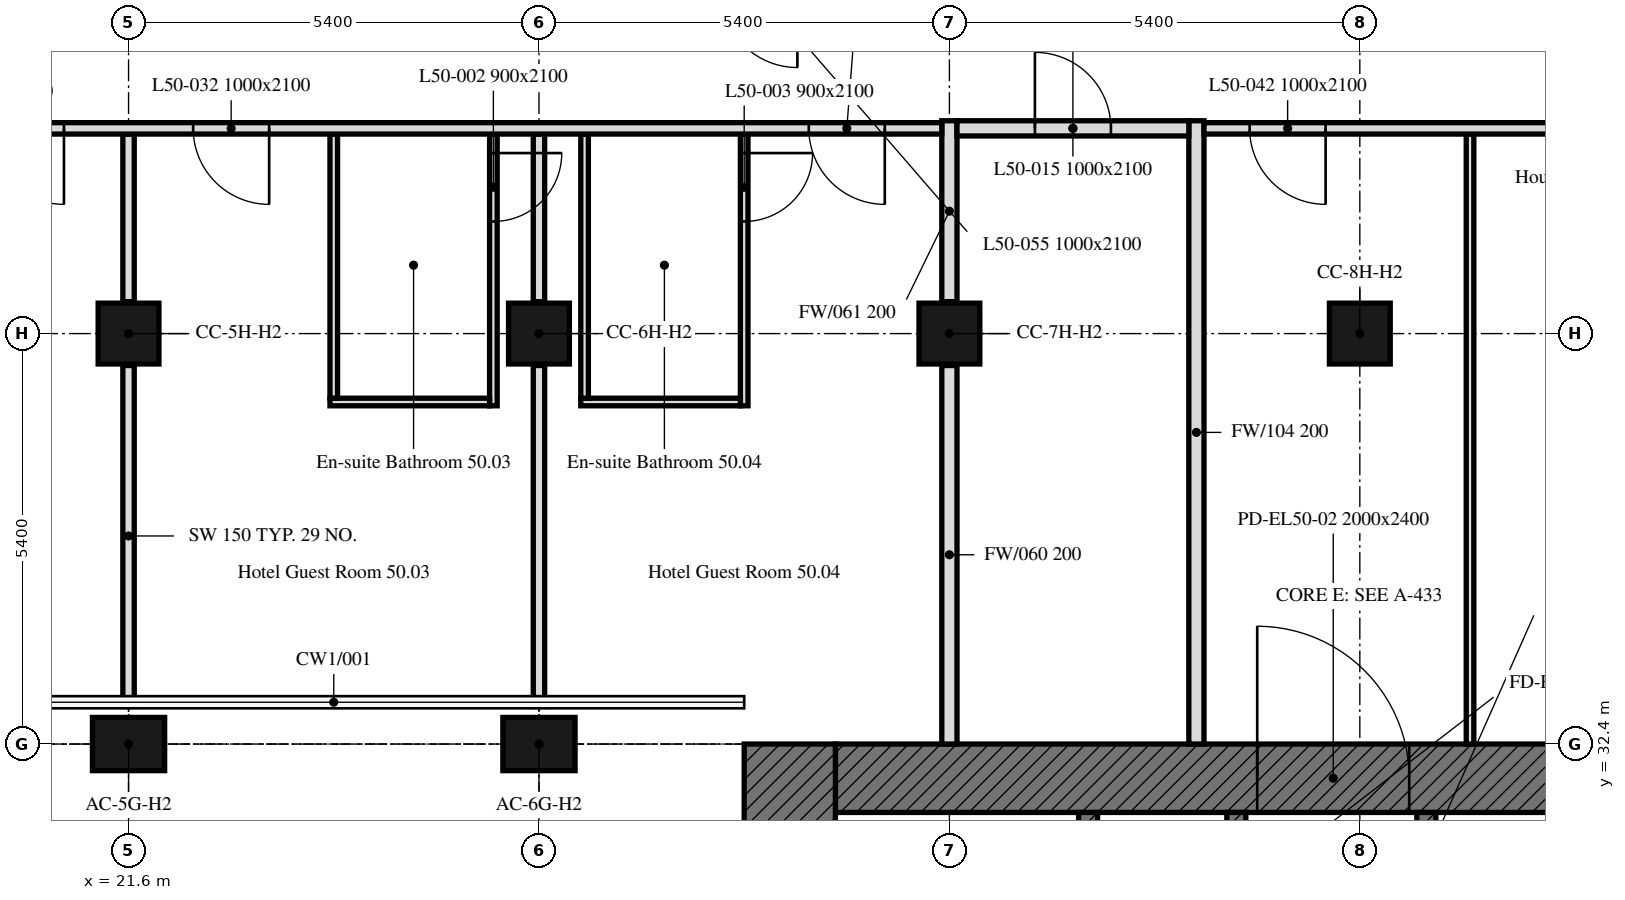
"""IFC4 building model, lengths in metres.
Left out: names, types, materials, properties, quantities, classifications, styles, units other than length and angle.
Written with IfcOpenShell. Run it as: python <this file> out.ifc"""

import sys

from ifc_helpers import new_model, si_unit, direction, frame, frame_2d, origin, origin_2d, place, context, subcontext, project, spatial, rectangle, extrude, element, fill, save


model = new_model("IFC4")
c1 = context("Model", 3, precision=1e-05, world=origin(), true_north=direction((0.0, 1.0)))
c2 = subcontext(c1, "Body", "Model", "MODEL_VIEW")
j1 = project(units=[si_unit("LENGTHUNIT", "METRE"), si_unit("PLANEANGLEUNIT", "RADIAN")], contexts=[c1])
p1 = place(None, origin())
s1 = spatial("IfcSite", under=j1, at=p1, CompositionType="ELEMENT")
p2 = place(p1, origin())
s2 = spatial("IfcBuilding", under=s1, at=p2, CompositionType="ELEMENT")
p3 = place(p2, frame((0.0, 0.0, 203.8)))
s3 = spatial("IfcBuildingStorey", under=s2, at=p3, CompositionType="ELEMENT", Elevation=203.8)
for number, where, z_axis, x_axis in (
    (1, (21.6, 32.4, 0.0), (0.0, 0.0, 1.0), (1.0, 0.0, 0.0)),
    (2, (27.0, 32.4, 0.0), (0.0, 0.0, 1.0), (1.0, 0.0, 0.0)),
):
    element("IfcColumn", number, at=place(p3, frame(where, z_axis=z_axis, x_axis=x_axis)), inside=s3, PredefinedType="COLUMN", context=c2, shape_type="SweptSolid", body=[
        extrude(rectangle(XDim=0.95, YDim=0.7, at=origin_2d()), origin(), (0.0, 0.0, 1.0), 3.0),
    ])
for number, where, z_axis, x_axis in (
    (3, (21.6, 37.8, 0.0), (0.0, 0.0, 1.0), (1.0, 0.0, 0.0)),
    (4, (27.0, 37.8, 0.0), (0.0, 0.0, 1.0), (1.0, 0.0, 0.0)),
    (5, (32.4, 37.8, 0.0), (0.0, 0.0, 1.0), (1.0, 0.0, 0.0)),
    (6, (37.8, 37.8, 0.0), (0.0, 0.0, 1.0), (1.0, 0.0, 0.0)),
):
    element("IfcColumn", number, at=place(p3, frame(where, z_axis=z_axis, x_axis=x_axis)), inside=s3, PredefinedType="COLUMN", context=c2, shape_type="SweptSolid", body=[
        extrude(rectangle(XDim=0.8, YDim=0.8, at=origin_2d()), origin(), (0.0, 0.0, 1.0), 3.0),
    ])
p4 = place(p3, frame((30.9, 31.95, 0.0), z_axis=(0.0, 0.0, 1.0), x_axis=(1.0, 0.0, 0.0)))
e7 = element("IfcWall", 7, at=p4, inside=s3, PredefinedType="SOLIDWALL", context=c2, shape_type="SweptSolid", body=[
    extrude(rectangle(XDim=11.1, YDim=0.9, at=frame_2d((5.55, 0.0))), origin(), (0.0, 0.0, 1.0), 3.0),
])
p5 = place(p4, frame((5.55, 0.0, 0.0)))
e8 = element("IfcOpeningElement", 8, at=p5, cuts=e7, PredefinedType="OPENING", context=c2, shape_type="SweptSolid", body=[
    extrude(rectangle(XDim=2.0, YDim=2.4, at=frame_2d((1.0, 1.2))), frame((0.0, 0.45, 0.0), z_axis=(0.0, -1.0, 0.0), x_axis=(1.0, 0.0, 0.0)), (0.0, 0.0, 1.0), 0.9),
])
p6 = place(p3, frame((30.3, 16.2, 0.0), z_axis=(0.0, 0.0, 1.0), x_axis=(0.0, 1.0, 0.0)))
e9 = element("IfcWall", 9, at=p6, inside=s3, PredefinedType="SOLIDWALL", context=c2, shape_type="SweptSolid", body=[
    extrude(rectangle(XDim=16.2, YDim=1.2, at=frame_2d((8.1, 0.0))), origin(), (0.0, 0.0, 1.0), 3.0),
])
p7 = place(p3, frame((38.675, 17.1, 0.0), z_axis=(0.0, 0.0, 1.0), x_axis=(0.0, 1.0, 0.0)))
e10 = element("IfcWall", 10, at=p7, inside=s3, PredefinedType="SOLIDWALL", context=c2, shape_type="SweptSolid", body=[
    extrude(rectangle(XDim=14.4, YDim=0.25, at=frame_2d((7.2, 0.0))), origin(), (0.0, 0.0, 1.0), 3.0),
])
p8 = place(p7, frame((4.6, 0.0, 0.0)))
e11 = element("IfcOpeningElement", 11, at=p8, cuts=e10, PredefinedType="OPENING", context=c2, shape_type="SweptSolid", body=[
    extrude(rectangle(XDim=1.0, YDim=2.1, at=frame_2d((0.5, 1.05))), frame((0.0, 0.125, 0.0), z_axis=(0.0, -1.0, 0.0), x_axis=(1.0, 0.0, 0.0)), (0.0, 0.0, 1.0), 0.25),
])
p9 = place(p7, frame((7.062, 0.0, 0.0)))
e12 = element("IfcOpeningElement", 12, at=p9, cuts=e10, PredefinedType="OPENING", context=c2, shape_type="SweptSolid", body=[
    extrude(rectangle(XDim=1.2, YDim=2.1, at=frame_2d((0.6, 1.05))), frame((0.0, 0.125, 0.0), z_axis=(0.0, -1.0, 0.0), x_axis=(1.0, 0.0, 0.0)), (0.0, 0.0, 1.0), 0.25),
])
p10 = place(p7, frame((10.106, 0.0, 0.0)))
e13 = element("IfcOpeningElement", 13, at=p10, cuts=e10, PredefinedType="OPENING", context=c2, shape_type="SweptSolid", body=[
    extrude(rectangle(XDim=0.9, YDim=2.1, at=frame_2d((0.45, 1.05))), frame((0.0, 0.125, 0.0), z_axis=(0.0, -1.0, 0.0), x_axis=(1.0, 0.0, 0.0)), (0.0, 0.0, 1.0), 0.25),
])
p11 = place(p7, frame((12.048, 0.0, 0.0)))
e14 = element("IfcOpeningElement", 14, at=p11, cuts=e10, PredefinedType="OPENING", context=c2, shape_type="SweptSolid", body=[
    extrude(rectangle(XDim=0.9, YDim=2.1, at=frame_2d((0.45, 1.05))), frame((0.0, 0.125, 0.0), z_axis=(0.0, -1.0, 0.0), x_axis=(1.0, 0.0, 0.0)), (0.0, 0.0, 1.0), 0.25),
])
p12 = place(p7, frame((13.354, 0.0, 0.0)))
e15 = element("IfcOpeningElement", 15, at=p12, cuts=e10, PredefinedType="OPENING", context=c2, shape_type="SweptSolid", body=[
    extrude(rectangle(XDim=0.9, YDim=2.1, at=frame_2d((0.45, 1.05))), frame((0.0, 0.125, 0.0), z_axis=(0.0, -1.0, 0.0), x_axis=(1.0, 0.0, 0.0)), (0.0, 0.0, 1.0), 0.25),
])
p13 = place(p3, frame((34.225, 17.1, 0.0), z_axis=(0.0, 0.0, 1.0), x_axis=(0.0, 1.0, 0.0)))
e16 = element("IfcWall", 16, at=p13, inside=s3, PredefinedType="SOLIDWALL", context=c2, shape_type="SweptSolid", body=[
    extrude(rectangle(XDim=14.4, YDim=0.25, at=frame_2d((7.2, 0.0))), origin(), (0.0, 0.0, 1.0), 3.0),
])
p14 = place(p13, frame((13.15, 0.0, 0.0)))
e17 = element("IfcOpeningElement", 17, at=p14, cuts=e16, PredefinedType="OPENING", context=c2, shape_type="SweptSolid", body=[
    extrude(rectangle(XDim=1.0, YDim=2.1, at=frame_2d((0.5, 1.05))), frame((0.0, 0.125, 0.0), z_axis=(0.0, -1.0, 0.0), x_axis=(1.0, 0.0, 0.0)), (0.0, 0.0, 1.0), 0.25),
])
p15 = place(p13, frame((0.6, 0.0, 0.0)))
e18 = element("IfcOpeningElement", 18, at=p15, cuts=e16, PredefinedType="OPENING", context=c2, shape_type="SweptSolid", body=[
    extrude(rectangle(XDim=1.1, YDim=2.1, at=frame_2d((0.55, 1.05))), frame((0.0, 0.125, 0.0), z_axis=(0.0, -1.0, 0.0), x_axis=(1.0, 0.0, 0.0)), (0.0, 0.0, 1.0), 0.25),
])
p16 = place(p13, frame((3.25, 0.0, 0.0)))
e19 = element("IfcOpeningElement", 19, at=p16, cuts=e16, PredefinedType="OPENING", context=c2, shape_type="SweptSolid", body=[
    extrude(rectangle(XDim=0.9, YDim=2.1, at=frame_2d((0.45, 1.05))), frame((0.0, 0.125, 0.0), z_axis=(0.0, -1.0, 0.0), x_axis=(1.0, 0.0, 0.0)), (0.0, 0.0, 1.0), 0.25),
])
p17 = place(p3, frame((36.175, 29.4, 0.0), z_axis=(0.0, 0.0, 1.0), x_axis=(0.0, 1.0, 0.0)))
e20 = element("IfcWall", 20, at=p17, inside=s3, PredefinedType="SOLIDWALL", context=c2, shape_type="SweptSolid", body=[
    extrude(rectangle(XDim=2.1, YDim=0.25, at=frame_2d((1.05, 0.0))), origin(), (0.0, 0.0, 1.0), 3.0),
])
p18 = place(p17, frame((0.5, 0.0, 0.0)))
e21 = element("IfcOpeningElement", 21, at=p18, cuts=e20, PredefinedType="OPENING", context=c2, shape_type="SweptSolid", body=[
    extrude(rectangle(XDim=1.0, YDim=2.1, at=frame_2d((0.5, 1.05))), frame((0.0, 0.125, 0.0), z_axis=(0.0, -1.0, 0.0), x_axis=(1.0, 0.0, 0.0)), (0.0, 0.0, 1.0), 0.25),
])
p19 = place(p3, frame((21.6, 32.895, 0.0), z_axis=(0.0, 0.0, 1.0), x_axis=(0.0, 1.0, 0.0)))
e22 = element("IfcWall", 22, at=p19, inside=s3, PredefinedType="PARTITIONING", context=c2, shape_type="SweptSolid", body=[
    extrude(rectangle(XDim=4.485, YDim=0.15, at=frame_2d((2.242, 0.0))), origin(), (0.0, 0.0, 1.0), 2.4),
])
p20 = place(p3, frame((21.6, 38.22, 0.0), z_axis=(0.0, 0.0, 1.0), x_axis=(0.0, 1.0, 0.0)))
e23 = element("IfcWall", 23, at=p20, inside=s3, PredefinedType="PARTITIONING", context=c2, shape_type="SweptSolid", body=[
    extrude(rectangle(XDim=2.205, YDim=0.15, at=frame_2d((1.103, 0.0))), origin(), (0.0, 0.0, 1.0), 2.4),
])
p21 = place(p3, frame((27.0, 32.895, 0.0), z_axis=(0.0, 0.0, 1.0), x_axis=(0.0, 1.0, 0.0)))
e24 = element("IfcWall", 24, at=p21, inside=s3, PredefinedType="PARTITIONING", context=c2, shape_type="SweptSolid", body=[
    extrude(rectangle(XDim=4.485, YDim=0.15, at=frame_2d((2.242, 0.0))), origin(), (0.0, 0.0, 1.0), 2.4),
])
p22 = place(p3, frame((27.0, 38.22, 0.0), z_axis=(0.0, 0.0, 1.0), x_axis=(0.0, 1.0, 0.0)))
e25 = element("IfcWall", 25, at=p22, inside=s3, PredefinedType="PARTITIONING", context=c2, shape_type="SweptSolid", body=[
    extrude(rectangle(XDim=2.205, YDim=0.15, at=frame_2d((1.103, 0.0))), origin(), (0.0, 0.0, 1.0), 2.4),
])
p23 = place(p3, frame((26.4, 40.425, 0.0), z_axis=(0.0, 0.0, 1.0), x_axis=(0.0, -1.0, 0.0)))
e26 = element("IfcWall", 26, at=p23, inside=s3, PredefinedType="PARTITIONING", context=c2, shape_type="SweptSolid", body=[
    extrude(rectangle(XDim=3.575, YDim=0.1, at=frame_2d((1.788, 0.0))), origin(), (0.0, 0.0, 1.0), 3.0),
])
p24 = place(p23, frame((0.25, 0.0, 0.0)))
e27 = element("IfcOpeningElement", 27, at=p24, cuts=e26, PredefinedType="OPENING", context=c2, shape_type="SweptSolid", body=[
    extrude(rectangle(XDim=0.9, YDim=2.1, at=frame_2d((0.45, 1.05))), frame((0.0, 0.05, 0.0), z_axis=(0.0, -1.0, 0.0), x_axis=(1.0, 0.0, 0.0)), (0.0, 0.0, 1.0), 0.1),
])
p25 = place(p3, frame((26.35, 36.9, 0.0), z_axis=(0.0, 0.0, 1.0), x_axis=(-1.0, 0.0, 0.0)))
e28 = element("IfcWall", 28, at=p25, inside=s3, PredefinedType="PARTITIONING", context=c2, shape_type="SweptSolid", body=[
    extrude(rectangle(XDim=2.1, YDim=0.1, at=frame_2d((1.05, 0.0))), origin(), (0.0, 0.0, 1.0), 3.0),
])
p26 = place(p3, frame((24.3, 36.95, 0.0), z_axis=(0.0, 0.0, 1.0), x_axis=(0.0, 1.0, 0.0)))
e29 = element("IfcWall", 29, at=p26, inside=s3, PredefinedType="PARTITIONING", context=c2, shape_type="SweptSolid", body=[
    extrude(rectangle(XDim=3.475, YDim=0.1, at=frame_2d((1.738, 0.0))), origin(), (0.0, 0.0, 1.0), 3.0),
])
p27 = place(p3, frame((32.4, 32.4, 0.0), z_axis=(0.0, 0.0, 1.0), x_axis=(0.0, 1.0, 0.0)))
e30 = element("IfcWall", 30, at=p27, inside=s3, PredefinedType="PARTITIONING", context=c2, shape_type="SweptSolid", body=[
    extrude(rectangle(XDim=4.98, YDim=0.2, at=frame_2d((2.49, 0.0))), origin(), (0.0, 0.0, 1.0), 2.4),
])
p28 = place(p3, frame((32.4, 38.22, 0.0), z_axis=(0.0, 0.0, 1.0), x_axis=(0.0, 1.0, 0.0)))
e31 = element("IfcWall", 31, at=p28, inside=s3, PredefinedType="PARTITIONING", context=c2, shape_type="SweptSolid", body=[
    extrude(rectangle(XDim=2.38, YDim=0.2, at=frame_2d((1.19, 0.0))), origin(), (0.0, 0.0, 1.0), 2.4),
])
p29 = place(p3, frame((29.7, 40.425, 0.0), z_axis=(0.0, 0.0, 1.0), x_axis=(0.0, -1.0, 0.0)))
e32 = element("IfcWall", 32, at=p29, inside=s3, PredefinedType="PARTITIONING", context=c2, shape_type="SweptSolid", body=[
    extrude(rectangle(XDim=3.575, YDim=0.1, at=frame_2d((1.788, 0.0))), origin(), (0.0, 0.0, 1.0), 3.0),
])
p30 = place(p29, frame((0.25, 0.0, 0.0)))
e33 = element("IfcOpeningElement", 33, at=p30, cuts=e32, PredefinedType="OPENING", context=c2, shape_type="SweptSolid", body=[
    extrude(rectangle(XDim=0.9, YDim=2.1, at=frame_2d((0.45, 1.05))), frame((0.0, 0.05, 0.0), z_axis=(0.0, -1.0, 0.0), x_axis=(1.0, 0.0, 0.0)), (0.0, 0.0, 1.0), 0.1),
])
p31 = place(p3, frame((29.65, 36.9, 0.0), z_axis=(0.0, 0.0, 1.0), x_axis=(-1.0, 0.0, 0.0)))
e34 = element("IfcWall", 34, at=p31, inside=s3, PredefinedType="PARTITIONING", context=c2, shape_type="SweptSolid", body=[
    extrude(rectangle(XDim=2.1, YDim=0.1, at=frame_2d((1.05, 0.0))), origin(), (0.0, 0.0, 1.0), 3.0),
])
p32 = place(p3, frame((27.6, 36.95, 0.0), z_axis=(0.0, 0.0, 1.0), x_axis=(0.0, 1.0, 0.0)))
e35 = element("IfcWall", 35, at=p32, inside=s3, PredefinedType="PARTITIONING", context=c2, shape_type="SweptSolid", body=[
    extrude(rectangle(XDim=3.475, YDim=0.1, at=frame_2d((1.738, 0.0))), origin(), (0.0, 0.0, 1.0), 3.0),
])
p33 = place(p3, frame((35.65, 40.6, 0.0), z_axis=(0.0, 0.0, 1.0), x_axis=(0.0, -1.0, 0.0)))
e36 = element("IfcWall", 36, at=p33, inside=s3, PredefinedType="PARTITIONING", context=c2, shape_type="SweptSolid", body=[
    extrude(rectangle(XDim=8.2, YDim=0.2, at=frame_2d((4.1, 0.0))), origin(), (0.0, 0.0, 1.0), 2.4),
])
p34 = place(p3, frame((39.25, 32.4, 0.0), z_axis=(0.0, 0.0, 1.0), x_axis=(0.0, 1.0, 0.0)))
e37 = element("IfcWall", 37, at=p34, inside=s3, PredefinedType="PARTITIONING", context=c2, shape_type="SweptSolid", body=[
    extrude(rectangle(XDim=8.025, YDim=0.1, at=frame_2d((4.013, 0.0))), origin(), (0.0, 0.0, 1.0), 2.4),
])
p35 = place(p3, frame((32.3, 40.5, 0.0), z_axis=(0.0, 0.0, 1.0), x_axis=(-1.0, 0.0, 0.0)))
e38 = element("IfcWall", 38, at=p35, inside=s3, PredefinedType="PARTITIONING", context=c2, shape_type="SweptSolid", body=[
    extrude(rectangle(XDim=26.149, YDim=0.15, at=frame_2d((13.075, 0.0))), origin(), (0.0, 0.0, 1.0), 2.4),
])
p36 = place(p35, frame((23.12, 0.0, 0.0)))
e39 = element("IfcOpeningElement", 39, at=p36, cuts=e38, PredefinedType="OPENING", context=c2, shape_type="SweptSolid", body=[
    extrude(rectangle(XDim=1.0, YDim=2.1, at=frame_2d((0.5, 1.05))), frame((0.0, 0.075, 0.0), z_axis=(0.0, -1.0, 0.0), x_axis=(1.0, 0.0, 0.0)), (0.0, 0.0, 1.0), 0.15),
])
p37 = place(p35, frame((17.225, 0.0, 0.0)))
e40 = element("IfcOpeningElement", 40, at=p37, cuts=e38, PredefinedType="OPENING", context=c2, shape_type="SweptSolid", body=[
    extrude(rectangle(XDim=1.0, YDim=2.1, at=frame_2d((0.5, 1.05))), frame((0.0, 0.075, 0.0), z_axis=(0.0, -1.0, 0.0), x_axis=(1.0, 0.0, 0.0)), (0.0, 0.0, 1.0), 0.15),
])
p38 = place(p35, frame((11.55, 0.0, 0.0)))
e41 = element("IfcOpeningElement", 41, at=p38, cuts=e38, PredefinedType="OPENING", context=c2, shape_type="SweptSolid", body=[
    extrude(rectangle(XDim=1.0, YDim=2.1, at=frame_2d((0.5, 1.05))), frame((0.0, 0.075, 0.0), z_axis=(0.0, -1.0, 0.0), x_axis=(1.0, 0.0, 0.0)), (0.0, 0.0, 1.0), 0.15),
])
p39 = place(p35, frame((8.85, 0.0, 0.0)))
e42 = element("IfcOpeningElement", 42, at=p39, cuts=e38, PredefinedType="OPENING", context=c2, shape_type="SweptSolid", body=[
    extrude(rectangle(XDim=1.0, YDim=2.1, at=frame_2d((0.5, 1.05))), frame((0.0, 0.075, 0.0), z_axis=(0.0, -1.0, 0.0), x_axis=(1.0, 0.0, 0.0)), (0.0, 0.0, 1.0), 0.15),
])
p40 = place(p35, frame((0.75, 0.0, 0.0)))
e43 = element("IfcOpeningElement", 43, at=p40, cuts=e38, PredefinedType="OPENING", context=c2, shape_type="SweptSolid", body=[
    extrude(rectangle(XDim=1.0, YDim=2.1, at=frame_2d((0.5, 1.05))), frame((0.0, 0.075, 0.0), z_axis=(0.0, -1.0, 0.0), x_axis=(1.0, 0.0, 0.0)), (0.0, 0.0, 1.0), 0.15),
])
p41 = place(p35, frame((20.05, 0.0, 0.0)))
e44 = element("IfcOpeningElement", 44, at=p41, cuts=e38, PredefinedType="OPENING", context=c2, shape_type="SweptSolid", body=[
    extrude(rectangle(XDim=1.0, YDim=2.1, at=frame_2d((0.5, 1.05))), frame((0.0, 0.075, 0.0), z_axis=(0.0, -1.0, 0.0), x_axis=(1.0, 0.0, 0.0)), (0.0, 0.0, 1.0), 0.15),
])
p42 = place(p3, frame((32.5, 40.5, 0.0), z_axis=(0.0, 0.0, 1.0), x_axis=(1.0, 0.0, 0.0)))
e45 = element("IfcWall", 45, at=p42, inside=s3, PredefinedType="PARTITIONING", context=c2, shape_type="SweptSolid", body=[
    extrude(rectangle(XDim=3.05, YDim=0.2, at=frame_2d((1.525, 0.0))), origin(), (0.0, 0.0, 1.0), 3.0),
])
p43 = place(p42, frame((1.025, 0.0, 0.0)))
e46 = element("IfcOpeningElement", 46, at=p43, cuts=e45, PredefinedType="OPENING", context=c2, shape_type="SweptSolid", body=[
    extrude(rectangle(XDim=1.0, YDim=2.1, at=frame_2d((0.5, 1.05))), frame((0.0, 0.1, 0.0), z_axis=(0.0, -1.0, 0.0), x_axis=(1.0, 0.0, 0.0)), (0.0, 0.0, 1.0), 0.2),
])
p44 = place(p3, frame((43.275, 40.5, 0.0), z_axis=(0.0, 0.0, 1.0), x_axis=(-1.0, 0.0, 0.0)))
e47 = element("IfcWall", 47, at=p44, inside=s3, PredefinedType="PARTITIONING", context=c2, shape_type="SweptSolid", body=[
    extrude(rectangle(XDim=7.525, YDim=0.15, at=frame_2d((3.762, 0.0))), origin(), (0.0, 0.0, 1.0), 2.4),
])
p45 = place(p44, frame((5.925, 0.0, 0.0)))
e48 = element("IfcOpeningElement", 48, at=p45, cuts=e47, PredefinedType="OPENING", context=c2, shape_type="SweptSolid", body=[
    extrude(rectangle(XDim=1.0, YDim=2.1, at=frame_2d((0.5, 1.05))), frame((0.0, 0.075, 0.0), z_axis=(0.0, -1.0, 0.0), x_axis=(1.0, 0.0, 0.0)), (0.0, 0.0, 1.0), 0.15),
])
p46 = place(p5, origin())
e49 = element("IfcDoor", 49, at=p46, inside=s3, OperationType="DOUBLE_DOOR_SINGLE_SWING", PredefinedType="DOOR", context=c2, shape_type="SweptSolid", body=[
    extrude(rectangle(XDim=2.0, YDim=2.4, at=frame_2d((1.0, 1.2))), frame((0.0, 0.025, 0.0), z_axis=(0.0, -1.0, 0.0), x_axis=(1.0, 0.0, 0.0)), (0.0, 0.0, 1.0), 0.05),
])
fill(e8, e49)
p47 = place(p24, origin())
e50 = element("IfcDoor", 50, at=p47, inside=s3, OperationType="SINGLE_SWING_RIGHT", PredefinedType="DOOR", context=c2, shape_type="SweptSolid", body=[
    extrude(rectangle(XDim=0.9, YDim=2.1, at=frame_2d((0.45, 1.05))), frame((0.0, 0.025, 0.0), z_axis=(0.0, -1.0, 0.0), x_axis=(1.0, 0.0, 0.0)), (0.0, 0.0, 1.0), 0.05),
])
fill(e27, e50)
p48 = place(p30, origin())
e51 = element("IfcDoor", 51, at=p48, inside=s3, OperationType="SINGLE_SWING_LEFT", PredefinedType="DOOR", context=c2, shape_type="SweptSolid", body=[
    extrude(rectangle(XDim=0.9, YDim=2.1, at=frame_2d((0.45, 1.05))), frame((0.0, 0.025, 0.0), z_axis=(0.0, -1.0, 0.0), x_axis=(1.0, 0.0, 0.0)), (0.0, 0.0, 1.0), 0.05),
])
fill(e33, e51)
p49 = place(p43, origin())
e52 = element("IfcDoor", 52, at=p49, inside=s3, OperationType="SINGLE_SWING_LEFT", PredefinedType="DOOR", context=c2, shape_type="SweptSolid", body=[
    extrude(rectangle(XDim=1.0, YDim=2.1, at=frame_2d((0.5, 1.05))), frame((0.0, 0.025, 0.0), z_axis=(0.0, -1.0, 0.0), x_axis=(1.0, 0.0, 0.0)), (0.0, 0.0, 1.0), 0.05),
])
fill(e46, e52)
p50 = place(p38, origin())
e53 = element("IfcDoor", 53, at=p50, inside=s3, OperationType="SINGLE_SWING_RIGHT", PredefinedType="DOOR", context=c2, shape_type="SweptSolid", body=[
    extrude(rectangle(XDim=1.0, YDim=2.1, at=frame_2d((0.5, 1.05))), frame((0.0, 0.025, 0.0), z_axis=(0.0, -1.0, 0.0), x_axis=(1.0, 0.0, 0.0)), (0.0, 0.0, 1.0), 0.05),
])
fill(e41, e53)
p51 = place(p39, origin())
e54 = element("IfcDoor", 54, at=p51, inside=s3, OperationType="SINGLE_SWING_LEFT", PredefinedType="DOOR", context=c2, shape_type="SweptSolid", body=[
    extrude(rectangle(XDim=1.0, YDim=2.1, at=frame_2d((0.5, 1.05))), frame((0.0, 0.025, 0.0), z_axis=(0.0, -1.0, 0.0), x_axis=(1.0, 0.0, 0.0)), (0.0, 0.0, 1.0), 0.05),
])
fill(e42, e54)
p52 = place(p40, origin())
e55 = element("IfcDoor", 55, at=p52, inside=s3, OperationType="SINGLE_SWING_RIGHT", PredefinedType="DOOR", context=c2, shape_type="SweptSolid", body=[
    extrude(rectangle(XDim=1.0, YDim=2.1, at=frame_2d((0.5, 1.05))), frame((0.0, 0.025, 0.0), z_axis=(0.0, -1.0, 0.0), x_axis=(1.0, 0.0, 0.0)), (0.0, 0.0, 1.0), 0.05),
])
fill(e43, e55)
p53 = place(p45, origin())
e56 = element("IfcDoor", 56, at=p53, inside=s3, OperationType="SINGLE_SWING_LEFT", PredefinedType="DOOR", context=c2, shape_type="SweptSolid", body=[
    extrude(rectangle(XDim=1.0, YDim=2.1, at=frame_2d((0.5, 1.05))), frame((0.0, 0.025, 0.0), z_axis=(0.0, -1.0, 0.0), x_axis=(1.0, 0.0, 0.0)), (0.0, 0.0, 1.0), 0.05),
])
fill(e48, e56)
save(model, sys.argv[1])
